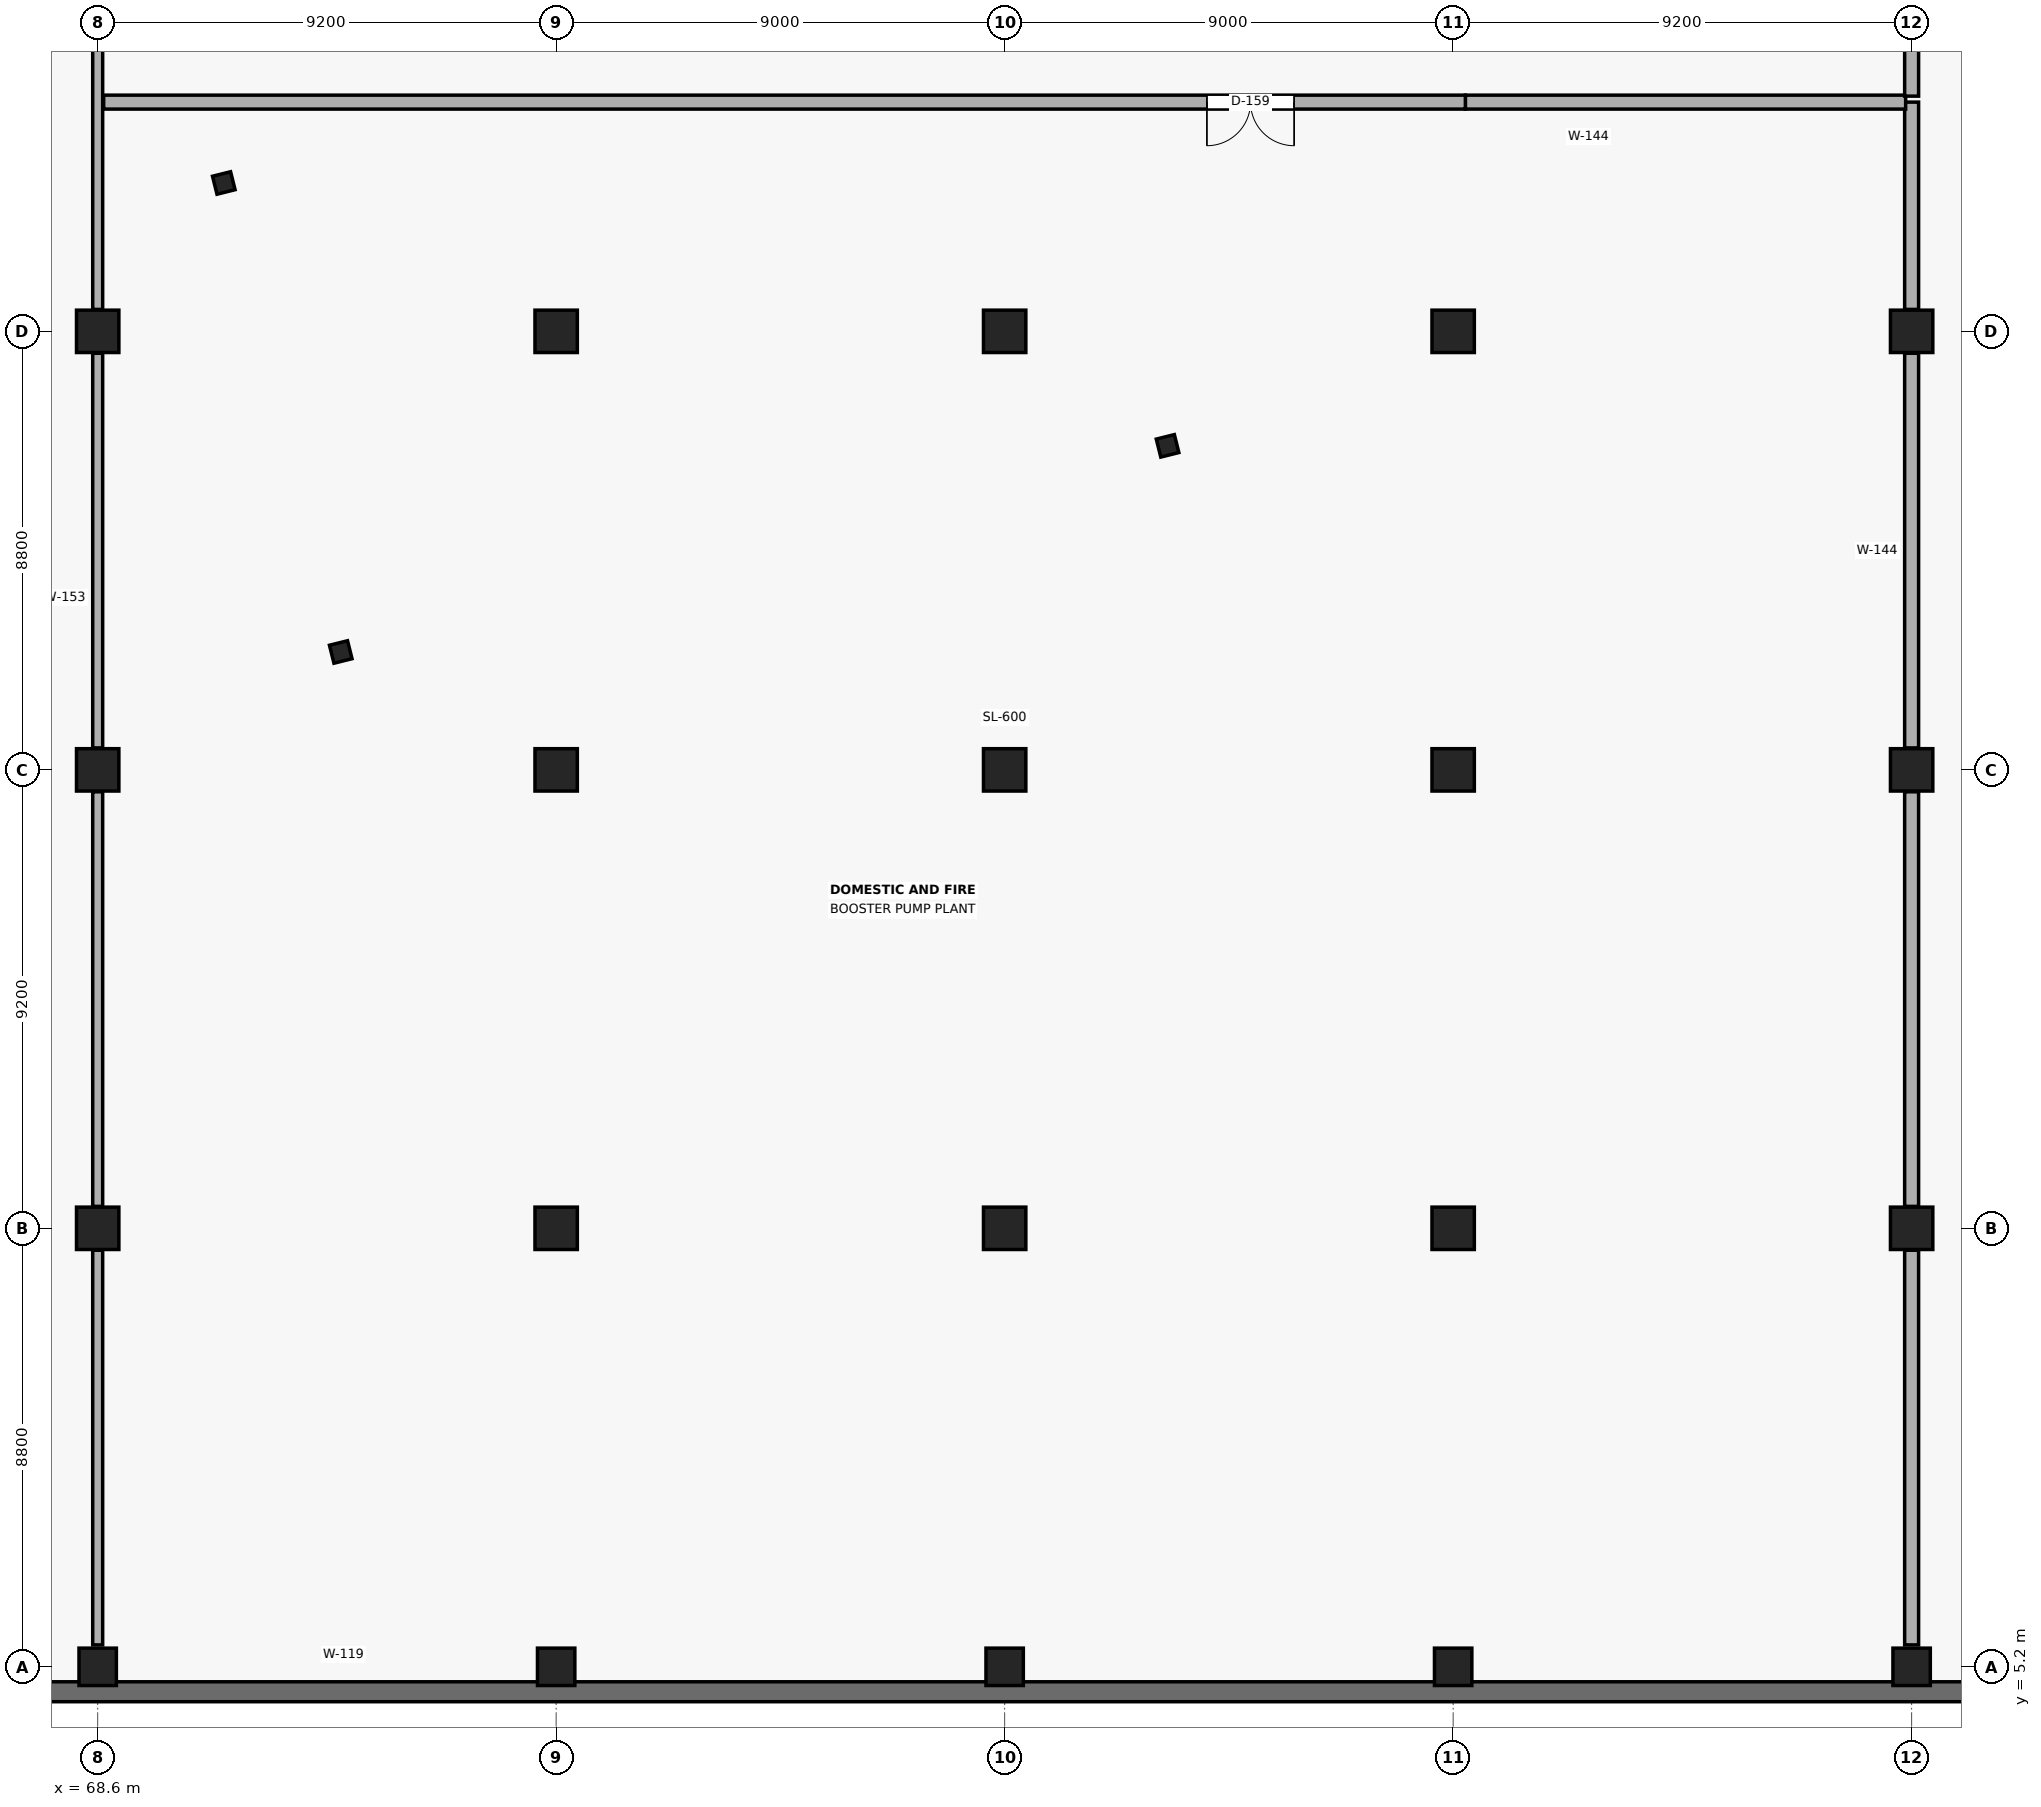
"""IFC4 building model, lengths in metres.
Left out: names, types, materials, properties, quantities, classifications, styles, units other than length and angle.
Written with IfcOpenShell. Run it as: python <this file> out.ifc"""

import sys

from ifc_helpers import new_model, si_unit, direction, frame, frame_2d, origin, origin_2d, place, context, subcontext, project, spatial, rectangle, i_section, extrude, element, fill, save


model = new_model("IFC4")
c1 = context("Model", 3, precision=1e-05, world=origin(), true_north=direction((0.0, 1.0)))
c2 = subcontext(c1, "Body", "Model", "MODEL_VIEW")
j1 = project(units=[si_unit("LENGTHUNIT", "METRE"), si_unit("PLANEANGLEUNIT", "RADIAN")], contexts=[c1])
p1 = place(None, origin())
s1 = spatial("IfcSite", under=j1, at=p1, CompositionType="ELEMENT")
p2 = place(p1, origin())
s2 = spatial("IfcBuilding", under=s1, at=p2, CompositionType="ELEMENT")
p3 = place(p2, frame((0.0, 0.0, -9.0)))
s3 = spatial("IfcBuildingStorey", under=s2, at=p3, CompositionType="ELEMENT", Elevation=-9.0)
p4 = place(p3, frame((68.6, 5.2, 0.0), z_axis=(0.0, 0.0, 1.0), x_axis=(1.0, 0.0, 0.0)))
e1 = element("IfcColumn", 1, at=p4, inside=s3, PredefinedType="COLUMN", context=c2, shape_type="SweptSolid", body=[
    extrude(rectangle(XDim=0.75, YDim=0.75, at=origin_2d()), origin(), (0.0, 0.0, 1.0), 4.5),
])
for number, where, z_axis, x_axis in (
    (2, (68.6, 14.0, 0.0), (0.0, 0.0, 1.0), (1.0, 0.0, 0.0)),
    (3, (68.6, 23.2, 0.0), (0.0, 0.0, 1.0), (1.0, 0.0, 0.0)),
    (4, (68.6, 32.0, 0.0), (0.0, 0.0, 1.0), (1.0, 0.0, 0.0)),
):
    element("IfcColumn", number, at=place(p3, frame(where, z_axis=z_axis, x_axis=x_axis)), inside=s3, PredefinedType="COLUMN", context=c2, shape_type="SweptSolid", body=[
        extrude(rectangle(XDim=0.85, YDim=0.85, at=origin_2d()), origin(), (0.0, 0.0, 1.0), 4.5),
    ])
p5 = place(p3, frame((77.8, 5.2, 0.0), z_axis=(0.0, 0.0, 1.0), x_axis=(1.0, 0.0, 0.0)))
e5 = element("IfcColumn", 5, at=p5, inside=s3, PredefinedType="COLUMN", context=c2, shape_type="SweptSolid", body=[
    extrude(rectangle(XDim=0.75, YDim=0.75, at=origin_2d()), origin(), (0.0, 0.0, 1.0), 4.5),
])
for number, where, z_axis, x_axis in (
    (6, (77.8, 14.0, 0.0), (0.0, 0.0, 1.0), (1.0, 0.0, 0.0)),
    (7, (77.8, 23.2, 0.0), (0.0, 0.0, 1.0), (1.0, 0.0, 0.0)),
    (8, (77.8, 32.0, 0.0), (0.0, 0.0, 1.0), (1.0, 0.0, 0.0)),
):
    element("IfcColumn", number, at=place(p3, frame(where, z_axis=z_axis, x_axis=x_axis)), inside=s3, PredefinedType="COLUMN", context=c2, shape_type="SweptSolid", body=[
        extrude(rectangle(XDim=0.85, YDim=0.85, at=origin_2d()), origin(), (0.0, 0.0, 1.0), 4.5),
    ])
p6 = place(p3, frame((86.8, 5.2, 0.0), z_axis=(0.0, 0.0, 1.0), x_axis=(1.0, 0.0, 0.0)))
e9 = element("IfcColumn", 9, at=p6, inside=s3, PredefinedType="COLUMN", context=c2, shape_type="SweptSolid", body=[
    extrude(rectangle(XDim=0.75, YDim=0.75, at=origin_2d()), origin(), (0.0, 0.0, 1.0), 4.5),
])
for number, where, z_axis, x_axis in (
    (10, (86.8, 14.0, 0.0), (0.0, 0.0, 1.0), (1.0, 0.0, 0.0)),
    (11, (86.8, 23.2, 0.0), (0.0, 0.0, 1.0), (1.0, 0.0, 0.0)),
    (12, (86.8, 32.0, 0.0), (0.0, 0.0, 1.0), (1.0, 0.0, 0.0)),
):
    element("IfcColumn", number, at=place(p3, frame(where, z_axis=z_axis, x_axis=x_axis)), inside=s3, PredefinedType="COLUMN", context=c2, shape_type="SweptSolid", body=[
        extrude(rectangle(XDim=0.85, YDim=0.85, at=origin_2d()), origin(), (0.0, 0.0, 1.0), 4.5),
    ])
p7 = place(p3, frame((95.8, 5.2, 0.0), z_axis=(0.0, 0.0, 1.0), x_axis=(1.0, 0.0, 0.0)))
e13 = element("IfcColumn", 13, at=p7, inside=s3, PredefinedType="COLUMN", context=c2, shape_type="SweptSolid", body=[
    extrude(rectangle(XDim=0.75, YDim=0.75, at=origin_2d()), origin(), (0.0, 0.0, 1.0), 4.5),
])
for number, where, z_axis, x_axis in (
    (14, (95.8, 14.0, 0.0), (0.0, 0.0, 1.0), (1.0, 0.0, 0.0)),
    (15, (95.8, 23.2, 0.0), (0.0, 0.0, 1.0), (1.0, 0.0, 0.0)),
    (16, (95.8, 32.0, 0.0), (0.0, 0.0, 1.0), (1.0, 0.0, 0.0)),
):
    element("IfcColumn", number, at=place(p3, frame(where, z_axis=z_axis, x_axis=x_axis)), inside=s3, PredefinedType="COLUMN", context=c2, shape_type="SweptSolid", body=[
        extrude(rectangle(XDim=0.85, YDim=0.85, at=origin_2d()), origin(), (0.0, 0.0, 1.0), 4.5),
    ])
p8 = place(p3, frame((105.0, 5.2, 0.0), z_axis=(0.0, 0.0, 1.0), x_axis=(1.0, 0.0, 0.0)))
e17 = element("IfcColumn", 17, at=p8, inside=s3, PredefinedType="COLUMN", context=c2, shape_type="SweptSolid", body=[
    extrude(rectangle(XDim=0.75, YDim=0.75, at=origin_2d()), origin(), (0.0, 0.0, 1.0), 4.5),
])
for number, where, z_axis, x_axis in (
    (18, (105.0, 14.0, 0.0), (0.0, 0.0, 1.0), (1.0, 0.0, 0.0)),
    (19, (105.0, 23.2, 0.0), (0.0, 0.0, 1.0), (1.0, 0.0, 0.0)),
    (20, (105.0, 32.0, 0.0), (0.0, 0.0, 1.0), (1.0, 0.0, 0.0)),
):
    element("IfcColumn", number, at=place(p3, frame(where, z_axis=z_axis, x_axis=x_axis)), inside=s3, PredefinedType="COLUMN", context=c2, shape_type="SweptSolid", body=[
        extrude(rectangle(XDim=0.85, YDim=0.85, at=origin_2d()), origin(), (0.0, 0.0, 1.0), 4.5),
    ])
for number, where, z_axis, x_axis in (
    (21, (73.477, 25.565, 0.0), (0.0, 0.0, 1.0), (0.97, 0.242, 0.0)),
    (22, (90.069, 29.702, 0.0), (0.0, 0.0, 1.0), (0.97, 0.242, 0.0)),
    (23, (71.131, 34.977, 0.0), (0.0, 0.0, 1.0), (0.97, 0.242, 0.0)),
):
    element("IfcColumn", number, at=place(p3, frame(where, z_axis=z_axis, x_axis=x_axis)), inside=s3, PredefinedType="COLUMN", context=c2, shape_type="SweptSolid", body=[
        extrude(i_section(OverallWidth=0.374, OverallDepth=0.372, WebThickness=0.016, FlangeThickness=0.026, at=origin_2d()), origin(), (0.0, 0.0, 1.0), 4.5),
    ])
p9 = place(p3, frame((4.5, 4.7, 0.0), z_axis=(0.0, 0.0, 1.0), x_axis=(1.0, 0.0, 0.0)))
e24 = element("IfcWall", 24, at=p9, inside=s3, PredefinedType="STANDARD", context=c2, shape_type="SweptSolid", body=[
    extrude(rectangle(XDim=163.0, YDim=0.4, at=frame_2d((81.5, 0.0))), origin(), (0.0, 0.0, 1.0), 4.17),
])
p10 = place(p3, frame((68.6, 5.64, 0.0), z_axis=(0.0, 0.0, 1.0), x_axis=(0.0, 1.0, 0.0)))
e25 = element("IfcWall", 25, at=p10, inside=s3, PredefinedType="STANDARD", context=c2, shape_type="SweptSolid", body=[
    extrude(rectangle(XDim=7.92, YDim=0.2, at=frame_2d((3.96, 0.0))), origin(), (0.0, 0.0, 1.0), 3.25),
])
p11 = place(p3, frame((68.6, 14.44, 0.0), z_axis=(0.0, 0.0, 1.0), x_axis=(0.0, 1.0, 0.0)))
e26 = element("IfcWall", 26, at=p11, inside=s3, PredefinedType="STANDARD", context=c2, shape_type="SweptSolid", body=[
    extrude(rectangle(XDim=8.32, YDim=0.2, at=frame_2d((4.16, 0.0))), origin(), (0.0, 0.0, 1.0), 3.25),
])
p12 = place(p3, frame((68.6, 23.64, 0.0), z_axis=(0.0, 0.0, 1.0), x_axis=(0.0, 1.0, 0.0)))
e27 = element("IfcWall", 27, at=p12, inside=s3, PredefinedType="STANDARD", context=c2, shape_type="SweptSolid", body=[
    extrude(rectangle(XDim=7.92, YDim=0.2, at=frame_2d((3.96, 0.0))), origin(), (0.0, 0.0, 1.0), 3.25),
])
p13 = place(p3, frame((68.6, 32.44, 0.0), z_axis=(0.0, 0.0, 1.0), x_axis=(0.0, 1.0, 0.0)))
e28 = element("IfcWall", 28, at=p13, inside=s3, PredefinedType="STANDARD", context=c2, shape_type="SweptSolid", body=[
    extrude(rectangle(XDim=8.16, YDim=0.2, at=frame_2d((4.08, 0.0))), origin(), (0.0, 0.0, 1.0), 4.1),
])
p14 = place(p3, frame((105.0, 5.64, 0.0), z_axis=(0.0, 0.0, 1.0), x_axis=(0.0, 1.0, 0.0)))
e29 = element("IfcWall", 29, at=p14, inside=s3, PredefinedType="STANDARD", context=c2, shape_type="SweptSolid", body=[
    extrude(rectangle(XDim=7.92, YDim=0.28, at=frame_2d((3.96, 0.0))), origin(), (0.0, 0.0, 1.0), 3.25),
])
p15 = place(p3, frame((105.0, 14.44, 0.0), z_axis=(0.0, 0.0, 1.0), x_axis=(0.0, 1.0, 0.0)))
e30 = element("IfcWall", 30, at=p15, inside=s3, PredefinedType="STANDARD", context=c2, shape_type="SweptSolid", body=[
    extrude(rectangle(XDim=8.32, YDim=0.28, at=frame_2d((4.16, 0.0))), origin(), (0.0, 0.0, 1.0), 3.25),
])
p16 = place(p3, frame((105.0, 23.64, 0.0), z_axis=(0.0, 0.0, 1.0), x_axis=(0.0, 1.0, 0.0)))
e31 = element("IfcWall", 31, at=p16, inside=s3, PredefinedType="STANDARD", context=c2, shape_type="SweptSolid", body=[
    extrude(rectangle(XDim=7.92, YDim=0.28, at=frame_2d((3.96, 0.0))), origin(), (0.0, 0.0, 1.0), 3.25),
])
p17 = place(p3, frame((105.0, 32.44, 0.0), z_axis=(0.0, 0.0, 1.0), x_axis=(0.0, 1.0, 0.0)))
e32 = element("IfcWall", 32, at=p17, inside=s3, PredefinedType="STANDARD", context=c2, shape_type="SweptSolid", body=[
    extrude(rectangle(XDim=4.16, YDim=0.28, at=frame_2d((2.08, 0.0))), origin(), (0.0, 0.0, 1.0), 3.25),
])
p18 = place(p3, frame((104.88, 36.6, 0.0), z_axis=(0.0, 0.0, 1.0), x_axis=(-1.0, 0.0, 0.0)))
e33 = element("IfcWall", 33, at=p18, inside=s3, PredefinedType="STANDARD", context=c2, shape_type="SweptSolid", body=[
    extrude(rectangle(XDim=8.835, YDim=0.28, at=frame_2d((4.417, 0.0))), origin(), (0.0, 0.0, 1.0), 3.5),
])
p19 = place(p3, frame((96.045, 36.6, 0.0), z_axis=(0.0, 0.0, 1.0), x_axis=(-1.0, 0.0, 0.0)))
e34 = element("IfcWall", 34, at=p19, inside=s3, PredefinedType="STANDARD", context=c2, shape_type="SweptSolid", body=[
    extrude(rectangle(XDim=27.325, YDim=0.28, at=frame_2d((13.663, 0.0))), origin(), (0.0, 0.0, 1.0), 4.1),
])
p20 = place(p19, frame((3.436, 0.0, 0.0)))
e35 = element("IfcOpeningElement", 35, at=p20, cuts=e34, PredefinedType="OPENING", context=c2, shape_type="SweptSolid", body=[
    extrude(rectangle(XDim=1.75, YDim=2.4, at=frame_2d((0.875, 1.2))), frame((0.0, 0.152, 0.0), z_axis=(0.0, -1.0, 0.0), x_axis=(1.0, 0.0, 0.0)), (0.0, 0.0, 1.0), 0.304),
])
p21 = place(p3, frame((105.0, 40.48, 0.0), z_axis=(0.0, 0.0, 1.0), x_axis=(0.0, -1.0, 0.0)))
e36 = element("IfcWall", 36, at=p21, inside=s3, PredefinedType="STANDARD", context=c2, shape_type="SweptSolid", body=[
    extrude(rectangle(XDim=3.76, YDim=0.28, at=frame_2d((1.88, 0.0))), origin(), (0.0, 0.0, 1.0), 3.25),
])
p22 = place(p20, origin())
e37 = element("IfcDoor", 37, at=p22, inside=s3, OperationType="DOUBLE_DOOR_SINGLE_SWING", PredefinedType="DOOR", context=c2, shape_type="SweptSolid", body=[
    extrude(rectangle(XDim=1.75, YDim=2.4, at=frame_2d((0.875, 1.2))), frame((0.0, 0.025, 0.0), z_axis=(0.0, -1.0, 0.0), x_axis=(1.0, 0.0, 0.0)), (0.0, 0.0, 1.0), 0.05),
])
fill(e35, e37)
save(model, sys.argv[1])
